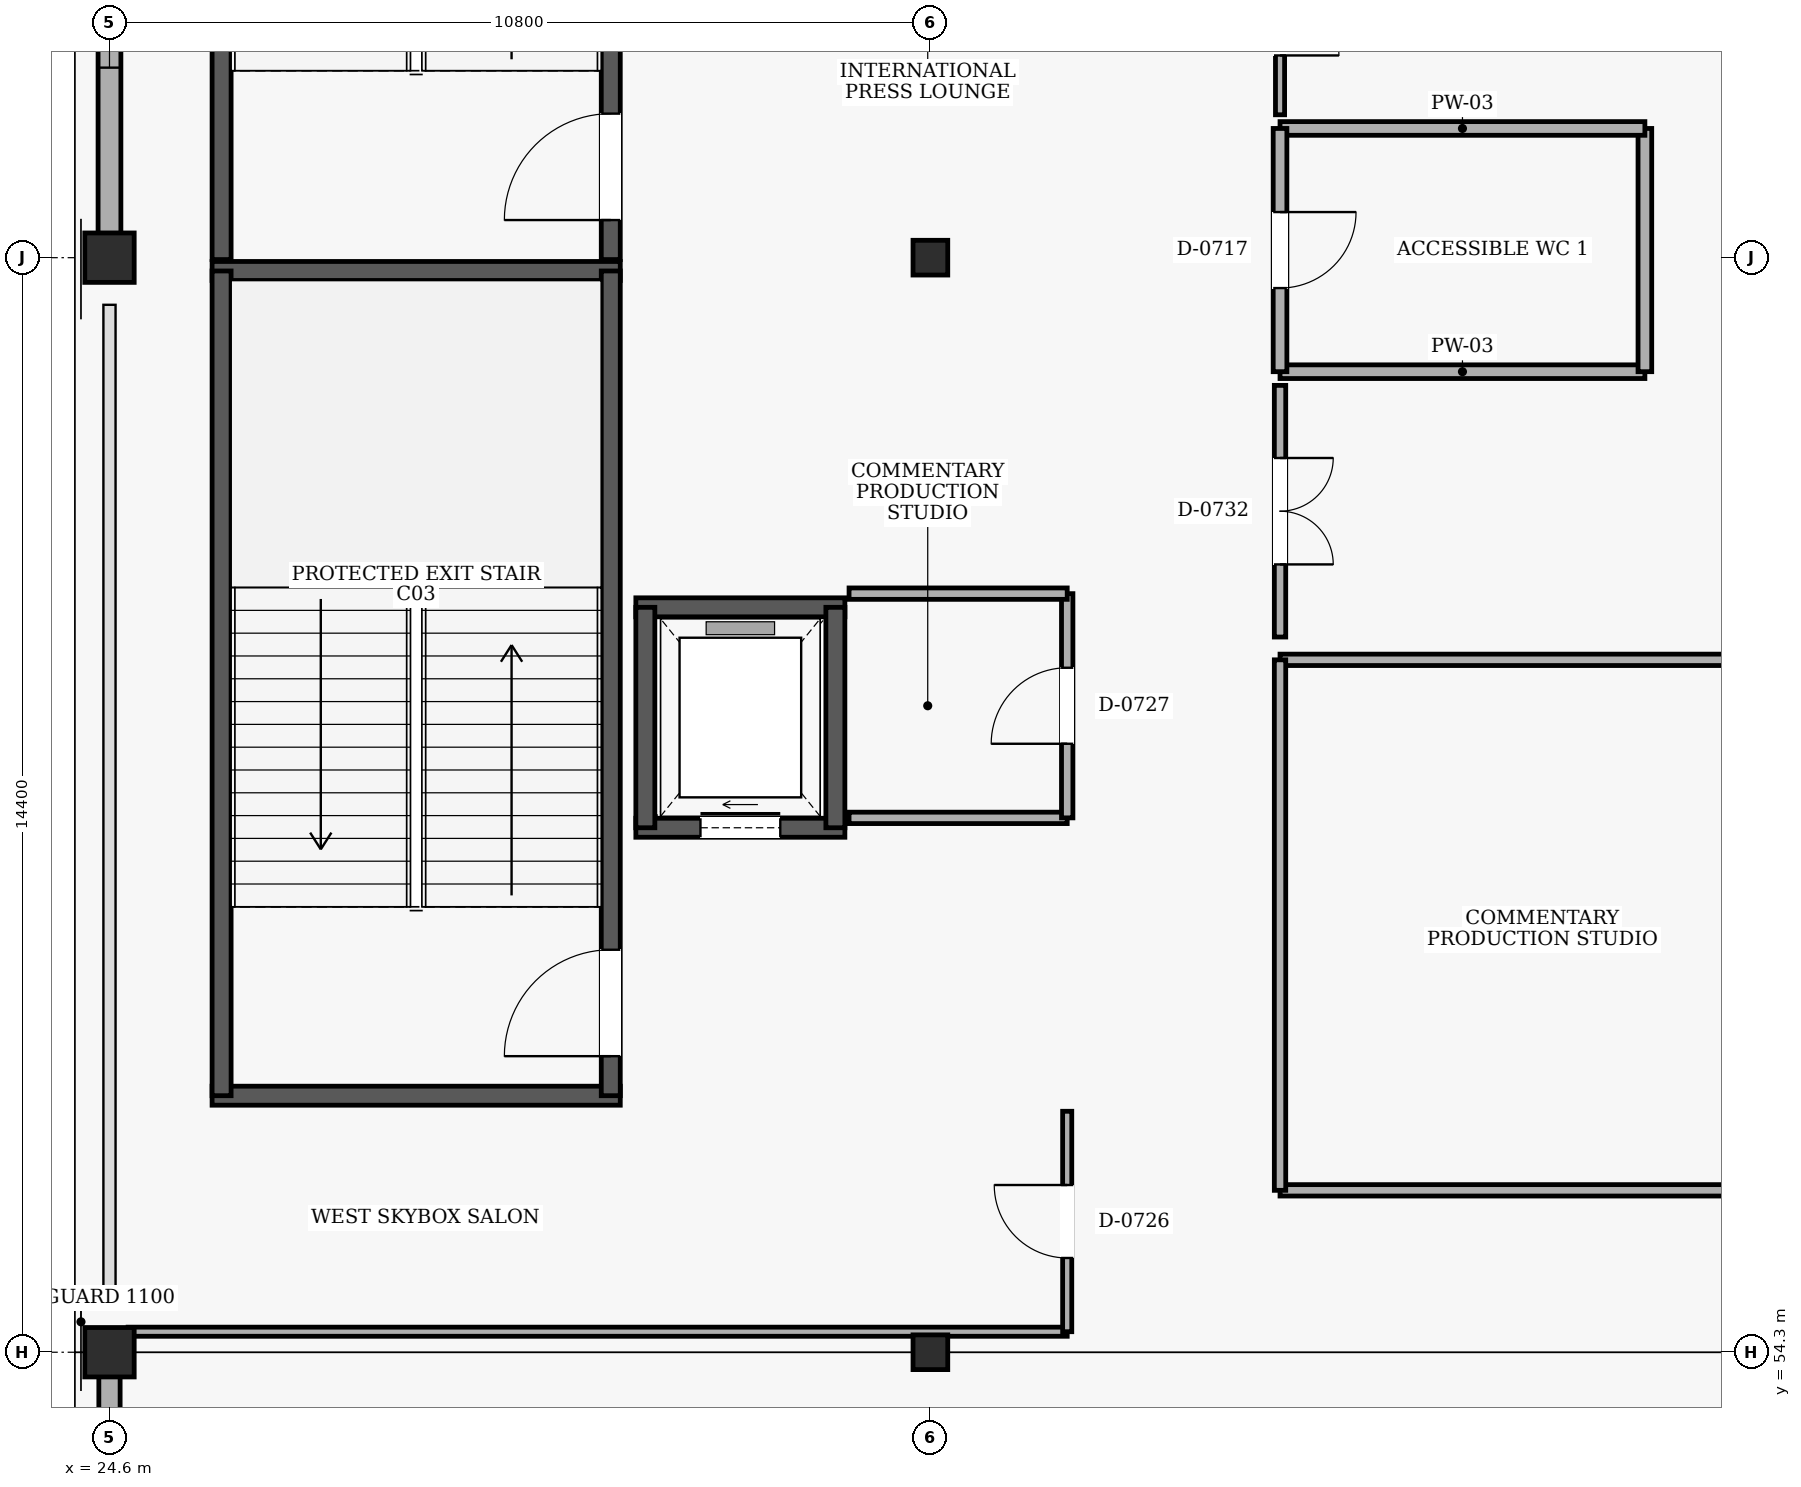
"""IFC4 building model, lengths in metres.
Left out: names, types, materials, properties, quantities, classifications, styles, units other than length and angle.
Written with IfcOpenShell. Run it as: python <this file> out.ifc"""

import sys

from ifc_helpers import new_model, si_unit, direction, frame, frame_2d, origin, origin_2d, place, context, subcontext, project, spatial, rectangle, hollow_circle, extrude, element, fill, save


model = new_model("IFC4")
c1 = context("Model", 3, precision=1e-05, world=origin(), true_north=direction((0.0, 1.0)))
c2 = subcontext(c1, "Body", "Model", "MODEL_VIEW")
j1 = project(units=[si_unit("LENGTHUNIT", "METRE"), si_unit("PLANEANGLEUNIT", "RADIAN")], contexts=[c1])
p1 = place(None, origin())
s1 = spatial("IfcSite", under=j1, at=p1, CompositionType="ELEMENT")
p2 = place(p1, origin())
s2 = spatial("IfcBuilding", under=s1, at=p2, CompositionType="ELEMENT")
p3 = place(p2, frame((0.0, 0.0, 19.8)))
s3 = spatial("IfcBuildingStorey", under=s2, at=p3, CompositionType="ELEMENT", Elevation=19.8)
for number, where, z_axis, x_axis in (
    (1, (24.6, 54.3, 0.0), (0.0, 0.0, 1.0), (1.0, 0.0, 0.0)),
    (2, (24.6, 68.7, 0.0), (0.0, 0.0, 1.0), (1.0, 0.0, 0.0)),
):
    element("IfcColumn", number, at=place(p3, frame(where, z_axis=z_axis, x_axis=x_axis)), inside=s3, PredefinedType="COLUMN", context=c2, shape_type="SweptSolid", body=[
        extrude(rectangle(XDim=0.65, YDim=0.65, at=origin_2d()), origin(), (0.0, 0.0, 1.0), 4.8),
    ])
for number, where, z_axis, x_axis in (
    (3, (35.4, 54.3, 0.0), (0.0, 0.0, 1.0), (1.0, 0.0, 0.0)),
    (4, (35.4, 68.7, 0.0), (0.0, 0.0, 1.0), (1.0, 0.0, 0.0)),
):
    element("IfcColumn", number, at=place(p3, frame(where, z_axis=z_axis, x_axis=x_axis)), inside=s3, PredefinedType="COLUMN", context=c2, shape_type="SweptSolid", body=[
        extrude(hollow_circle(Radius=0.229, WallThickness=0.02, at=origin_2d()), origin(), (0.0, 0.0, 1.0), 4.8),
    ])
p4 = place(p3, frame((24.6, 47.42, 0.0), z_axis=(0.0, 0.0, 1.0), x_axis=(0.0, 1.0, 0.0)))
e5 = element("IfcWall", 5, at=p4, inside=s3, PredefinedType="SOLIDWALL", context=c2, shape_type="SweptSolid", body=[
    extrude(rectangle(XDim=6.56, YDim=0.28, at=frame_2d((3.28, 0.0))), origin(), (0.0, 0.0, 1.0), 3.88),
])
p5 = place(p4, frame((2.48, 0.0, 0.9)))
e6 = element("IfcOpeningElement", 6, at=p5, cuts=e5, PredefinedType="OPENING", context=c2, shape_type="SweptSolid", body=[
    extrude(rectangle(XDim=1.6, YDim=1.5, at=frame_2d((0.8, 0.75))), frame((0.0, 0.15, 0.0), z_axis=(0.0, -1.0, 0.0), x_axis=(1.0, 0.0, 0.0)), (0.0, 0.0, 1.0), 0.3),
])
p6 = place(p3, frame((24.6, 69.02, 0.0), z_axis=(0.0, 0.0, 1.0), x_axis=(0.0, 1.0, 0.0)))
e7 = element("IfcWall", 7, at=p6, inside=s3, PredefinedType="SOLIDWALL", context=c2, shape_type="SweptSolid", body=[
    extrude(rectangle(XDim=6.16, YDim=0.3, at=frame_2d((3.08, 0.0))), origin(), (0.0, 0.0, 1.0), 3.88),
])
p7 = place(p6, frame((2.18, 0.0, 0.9)))
e8 = element("IfcOpeningElement", 8, at=p7, cuts=e7, PredefinedType="OPENING", context=c2, shape_type="SweptSolid", body=[
    extrude(rectangle(XDim=1.8, YDim=1.5, at=frame_2d((0.9, 0.75))), frame((0.0, 0.16, 0.0), z_axis=(0.0, -1.0, 0.0), x_axis=(1.0, 0.0, 0.0)), (0.0, 0.0, 1.0), 0.32),
])
for number, where, z_axis, x_axis in (
    (9, (25.95, 57.675, 0.0), (0.0, 0.0, 1.0), (1.0, 0.0, 0.0)),
    (10, (31.32, 68.525, 0.0), (0.0, 0.0, 1.0), (-1.0, 0.0, 0.0)),
):
    element("IfcWall", number, at=place(p3, frame(where, z_axis=z_axis, x_axis=x_axis)), inside=s3, PredefinedType="SHEAR", context=c2, shape_type="SweptSolid", body=[
        extrude(rectangle(XDim=5.37, YDim=0.25, at=frame_2d((2.685, 0.0))), origin(), (0.0, 0.0, 1.0), 4.5),
    ])
p8 = place(p3, frame((26.075, 57.675, 0.0), z_axis=(0.0, 0.0, 1.0), x_axis=(0.0, 1.0, 0.0)))
e11 = element("IfcWall", 11, at=p8, inside=s3, PredefinedType="SHEAR", context=c2, shape_type="SweptSolid", body=[
    extrude(rectangle(XDim=10.85, YDim=0.25, at=frame_2d((5.425, 0.0))), origin(), (0.0, 0.0, 1.0), 4.5),
])
p9 = place(p3, frame((31.195, 57.675, 0.0), z_axis=(0.0, 0.0, 1.0), x_axis=(0.0, 1.0, 0.0)))
e12 = element("IfcWall", 12, at=p9, inside=s3, PredefinedType="SHEAR", context=c2, shape_type="SweptSolid", body=[
    extrude(rectangle(XDim=10.85, YDim=0.25, at=frame_2d((5.425, 0.0))), origin(), (0.0, 0.0, 1.0), 4.5),
])
p10 = place(p9, frame((0.52, 0.0, 0.0)))
e13 = element("IfcOpeningElement", 13, at=p10, cuts=e12, PredefinedType="OPENING", context=c2, shape_type="SweptSolid", body=[
    extrude(rectangle(XDim=1.4, YDim=2.15, at=frame_2d((0.7, 1.075))), frame((0.0, 0.135, 0.0), z_axis=(0.0, -1.0, 0.0), x_axis=(1.0, 0.0, 0.0)), (0.0, 0.0, 1.0), 0.27),
])
p11 = place(p3, frame((26.075, 68.675, 0.0), z_axis=(0.0, 0.0, 1.0), x_axis=(0.0, 1.0, 0.0)))
e14 = element("IfcWall", 14, at=p11, inside=s3, PredefinedType="SHEAR", context=c2, shape_type="SweptSolid", body=[
    extrude(rectangle(XDim=10.85, YDim=0.25, at=frame_2d((5.425, 0.0))), origin(), (0.0, 0.0, 1.0), 4.5),
])
p12 = place(p3, frame((31.195, 68.675, 0.0), z_axis=(0.0, 0.0, 1.0), x_axis=(0.0, 1.0, 0.0)))
e15 = element("IfcWall", 15, at=p12, inside=s3, PredefinedType="SHEAR", context=c2, shape_type="SweptSolid", body=[
    extrude(rectangle(XDim=10.85, YDim=0.25, at=frame_2d((5.425, 0.0))), origin(), (0.0, 0.0, 1.0), 4.5),
])
p13 = place(p12, frame((0.52, 0.0, 0.0)))
e16 = element("IfcOpeningElement", 16, at=p13, cuts=e15, PredefinedType="OPENING", context=c2, shape_type="SweptSolid", body=[
    extrude(rectangle(XDim=1.4, YDim=2.15, at=frame_2d((0.7, 1.075))), frame((0.0, 0.135, 0.0), z_axis=(0.0, -1.0, 0.0), x_axis=(1.0, 0.0, 0.0)), (0.0, 0.0, 1.0), 0.27),
])
p14 = place(p3, frame((31.525, 61.2, 0.0), z_axis=(0.0, 0.0, 1.0), x_axis=(1.0, 0.0, 0.0)))
e17 = element("IfcWall", 17, at=p14, inside=s3, PredefinedType="SHEAR", context=c2, shape_type="SweptSolid", body=[
    extrude(rectangle(XDim=2.75, YDim=0.25, at=frame_2d((1.375, 0.0))), origin(), (0.0, 0.0, 1.0), 4.5),
])
p15 = place(p14, frame((0.85, 0.0, 0.0)))
e18 = element("IfcOpeningElement", 18, at=p15, cuts=e17, PredefinedType="OPENING", context=c2, shape_type="SweptSolid", body=[
    extrude(rectangle(XDim=1.05, YDim=2.15, at=frame_2d((0.525, 1.075))), frame((0.0, 0.135, 0.0), z_axis=(0.0, -1.0, 0.0), x_axis=(1.0, 0.0, 0.0)), (0.0, 0.0, 1.0), 0.27),
])
p16 = place(p3, frame((34.275, 64.1, 0.0), z_axis=(0.0, 0.0, 1.0), x_axis=(-1.0, 0.0, 0.0)))
e19 = element("IfcWall", 19, at=p16, inside=s3, PredefinedType="SHEAR", context=c2, shape_type="SweptSolid", body=[
    extrude(rectangle(XDim=2.75, YDim=0.25, at=frame_2d((1.375, 0.0))), origin(), (0.0, 0.0, 1.0), 4.5),
])
for number, where, z_axis, x_axis in (
    (20, (31.65, 64.1, 0.0), (0.0, 0.0, 1.0), (0.0, -1.0, 0.0)),
    (21, (34.15, 61.2, 0.0), (0.0, 0.0, 1.0), (0.0, 1.0, 0.0)),
):
    element("IfcWall", number, at=place(p3, frame(where, z_axis=z_axis, x_axis=x_axis)), inside=s3, PredefinedType="SHEAR", context=c2, shape_type="SweptSolid", body=[
        extrude(rectangle(XDim=2.9, YDim=0.25, at=frame_2d((1.45, 0.0))), origin(), (0.0, 0.0, 1.0), 4.5),
    ])
p17 = place(p3, frame((40.0, 67.2, 0.0), z_axis=(0.0, 0.0, 1.0), x_axis=(1.0, 0.0, 0.0)))
e22 = element("IfcWall", 22, at=p17, inside=s3, PredefinedType="PARTITIONING", context=c2, shape_type="SweptSolid", body=[
    extrude(rectangle(XDim=4.8, YDim=0.18, at=frame_2d((2.4, 0.0))), origin(), (0.0, 0.0, 1.0), 4.5),
])
p18 = place(p3, frame((44.8, 67.2, 0.0), z_axis=(0.0, 0.0, 1.0), x_axis=(0.0, 1.0, 0.0)))
e23 = element("IfcWall", 23, at=p18, inside=s3, PredefinedType="PARTITIONING", context=c2, shape_type="SweptSolid", body=[
    extrude(rectangle(XDim=3.2, YDim=0.18, at=frame_2d((1.6, 0.0))), origin(), (0.0, 0.0, 1.0), 4.5),
])
p19 = place(p3, frame((44.8, 70.4, 0.0), z_axis=(0.0, 0.0, 1.0), x_axis=(-1.0, 0.0, 0.0)))
e24 = element("IfcWall", 24, at=p19, inside=s3, PredefinedType="PARTITIONING", context=c2, shape_type="SweptSolid", body=[
    extrude(rectangle(XDim=4.8, YDim=0.18, at=frame_2d((2.4, 0.0))), origin(), (0.0, 0.0, 1.0), 4.5),
])
p20 = place(p3, frame((40.0, 70.4, 0.0), z_axis=(0.0, 0.0, 1.0), x_axis=(0.0, -1.0, 0.0)))
e25 = element("IfcWall", 25, at=p20, inside=s3, PredefinedType="PARTITIONING", context=c2, shape_type="SweptSolid", body=[
    extrude(rectangle(XDim=3.2, YDim=0.18, at=frame_2d((1.6, 0.0))), origin(), (0.0, 0.0, 1.0), 4.5),
])
p21 = place(p20, frame((1.1, 0.0, 0.0)))
e26 = element("IfcOpeningElement", 26, at=p21, cuts=e25, PredefinedType="OPENING", context=c2, shape_type="SweptSolid", body=[
    extrude(rectangle(XDim=1.0, YDim=2.1, at=frame_2d((0.5, 1.05))), frame((0.0, 0.1, 0.0), z_axis=(0.0, -1.0, 0.0), x_axis=(1.0, 0.0, 0.0)), (0.0, 0.0, 1.0), 0.2),
])
p22 = place(p3, frame((24.845, 54.57, 0.0), z_axis=(0.0, 0.0, 1.0), x_axis=(1.0, 0.0, 0.0)))
e27 = element("IfcWall", 27, at=p22, inside=s3, PredefinedType="PARTITIONING", context=c2, shape_type="SweptSolid", body=[
    extrude(rectangle(XDim=12.355, YDim=0.12, at=frame_2d((6.177, 0.0))), origin(), (0.0, 0.0, 1.0), 3.58),
])
p23 = place(p3, frame((37.2, 54.57, 0.0), z_axis=(0.0, 0.0, 1.0), x_axis=(0.0, 1.0, 0.0)))
e28 = element("IfcWall", 28, at=p23, inside=s3, PredefinedType="PARTITIONING", context=c2, shape_type="SweptSolid", body=[
    extrude(rectangle(XDim=2.9, YDim=0.12, at=frame_2d((1.45, 0.0))), origin(), (0.0, 0.0, 1.0), 4.5),
])
p24 = place(p23, frame((0.97, 0.0, 0.0)))
e29 = element("IfcOpeningElement", 29, at=p24, cuts=e28, PredefinedType="OPENING", context=c2, shape_type="SweptSolid", body=[
    extrude(rectangle(XDim=0.96, YDim=2.1, at=frame_2d((0.48, 1.05))), frame((0.0, 0.07, 0.0), z_axis=(0.0, -1.0, 0.0), x_axis=(1.0, 0.0, 0.0)), (0.0, 0.0, 1.0), 0.14),
])
p25 = place(p3, frame((34.33, 61.33, 0.0), z_axis=(0.0, 0.0, 1.0), x_axis=(1.0, 0.0, 0.0)))
e30 = element("IfcWall", 30, at=p25, inside=s3, PredefinedType="PARTITIONING", context=c2, shape_type="SweptSolid", body=[
    extrude(rectangle(XDim=2.87, YDim=0.15, at=frame_2d((1.435, 0.0))), origin(), (0.0, 0.0, 1.0), 4.5),
])
p26 = place(p3, frame((37.2, 61.33, 0.0), z_axis=(0.0, 0.0, 1.0), x_axis=(0.0, 1.0, 0.0)))
e31 = element("IfcWall", 31, at=p26, inside=s3, PredefinedType="PARTITIONING", context=c2, shape_type="SweptSolid", body=[
    extrude(rectangle(XDim=2.95, YDim=0.15, at=frame_2d((1.475, 0.0))), origin(), (0.0, 0.0, 1.0), 4.5),
])
p27 = place(p26, frame((0.975, 0.0, 0.0)))
e32 = element("IfcOpeningElement", 32, at=p27, cuts=e31, PredefinedType="OPENING", context=c2, shape_type="SweptSolid", body=[
    extrude(rectangle(XDim=1.0, YDim=2.1, at=frame_2d((0.5, 1.05))), frame((0.0, 0.085, 0.0), z_axis=(0.0, -1.0, 0.0), x_axis=(1.0, 0.0, 0.0)), (0.0, 0.0, 1.0), 0.17),
])
p28 = place(p3, frame((37.2, 64.28, 0.0), z_axis=(0.0, 0.0, 1.0), x_axis=(-1.0, 0.0, 0.0)))
e33 = element("IfcWall", 33, at=p28, inside=s3, PredefinedType="PARTITIONING", context=c2, shape_type="SweptSolid", body=[
    extrude(rectangle(XDim=2.87, YDim=0.15, at=frame_2d((1.435, 0.0))), origin(), (0.0, 0.0, 1.0), 4.5),
])
p29 = place(p3, frame((40.0, 56.43, 0.0), z_axis=(0.0, 0.0, 1.0), x_axis=(1.0, 0.0, 0.0)))
e34 = element("IfcWall", 34, at=p29, inside=s3, PredefinedType="PARTITIONING", context=c2, shape_type="SweptSolid", body=[
    extrude(rectangle(XDim=14.48, YDim=0.15, at=frame_2d((7.24, 0.0))), origin(), (0.0, 0.0, 1.0), 4.5),
])
p30 = place(p29, frame((7.588, 0.0, 0.0)))
e35 = element("IfcOpeningElement", 35, at=p30, cuts=e34, PredefinedType="OPENING", context=c2, shape_type="SweptSolid", body=[
    extrude(rectangle(XDim=1.3, YDim=2.2, at=frame_2d((0.65, 1.1))), frame((0.0, 0.085, 0.0), z_axis=(0.0, -1.0, 0.0), x_axis=(1.0, 0.0, 0.0)), (0.0, 0.0, 1.0), 0.17),
])
p31 = place(p3, frame((54.48, 63.409, 0.0), z_axis=(0.0, 0.0, 1.0), x_axis=(-1.0, 0.0, 0.0)))
e36 = element("IfcWall", 36, at=p31, inside=s3, PredefinedType="PARTITIONING", context=c2, shape_type="SweptSolid", body=[
    extrude(rectangle(XDim=14.48, YDim=0.15, at=frame_2d((7.24, 0.0))), origin(), (0.0, 0.0, 1.0), 4.5),
])
p32 = place(p3, frame((40.0, 63.409, 0.0), z_axis=(0.0, 0.0, 1.0), x_axis=(0.0, -1.0, 0.0)))
e37 = element("IfcWall", 37, at=p32, inside=s3, PredefinedType="PARTITIONING", context=c2, shape_type="SweptSolid", body=[
    extrude(rectangle(XDim=6.979, YDim=0.15, at=frame_2d((3.49, 0.0))), origin(), (0.0, 0.0, 1.0), 4.5),
])
p33 = place(p3, frame((40.0, 67.02, 0.0), z_axis=(0.0, 0.0, 1.0), x_axis=(0.0, -1.0, 0.0)))
e38 = element("IfcWall", 38, at=p33, inside=s3, PredefinedType="PARTITIONING", context=c2, shape_type="SweptSolid", body=[
    extrude(rectangle(XDim=3.311, YDim=0.15, at=frame_2d((1.655, 0.0))), origin(), (0.0, 0.0, 1.0), 4.5),
])
p34 = place(p33, frame((0.955, 0.0, 0.0)))
e39 = element("IfcOpeningElement", 39, at=p34, cuts=e38, PredefinedType="OPENING", context=c2, shape_type="SweptSolid", body=[
    extrude(rectangle(XDim=1.4, YDim=2.2, at=frame_2d((0.7, 1.1))), frame((0.0, 0.085, 0.0), z_axis=(0.0, -1.0, 0.0), x_axis=(1.0, 0.0, 0.0)), (0.0, 0.0, 1.0), 0.17),
])
p35 = place(p3, frame((40.0, 73.691, 0.0), z_axis=(0.0, 0.0, 1.0), x_axis=(0.0, -1.0, 0.0)))
e40 = element("IfcWall", 40, at=p35, inside=s3, PredefinedType="PARTITIONING", context=c2, shape_type="SweptSolid", body=[
    extrude(rectangle(XDim=3.111, YDim=0.12, at=frame_2d((1.555, 0.0))), origin(), (0.0, 0.0, 1.0), 4.5),
])
p36 = place(p35, frame((0.781, 0.0, 0.0)))
e41 = element("IfcOpeningElement", 41, at=p36, cuts=e40, PredefinedType="OPENING", context=c2, shape_type="SweptSolid", body=[
    extrude(rectangle(XDim=1.55, YDim=2.2, at=frame_2d((0.775, 1.1))), frame((0.0, 0.07, 0.0), z_axis=(0.0, -1.0, 0.0), x_axis=(1.0, 0.0, 0.0)), (0.0, 0.0, 1.0), 0.14),
])
p37 = place(p7, origin())
e42 = element("IfcWindow", 42, at=p37, inside=s3, PartitioningType="SINGLE_PANEL", PredefinedType="WINDOW", context=c2, shape_type="SweptSolid", body=[
    extrude(rectangle(XDim=1.8, YDim=1.5, at=frame_2d((0.9, 0.75))), frame((0.0, 0.03, 0.0), z_axis=(0.0, -1.0, 0.0), x_axis=(1.0, 0.0, 0.0)), (0.0, 0.0, 1.0), 0.06),
])
fill(e8, e42)
p38 = place(p10, origin())
e43 = element("IfcDoor", 43, at=p38, inside=s3, OperationType="SINGLE_SWING_LEFT", PredefinedType="DOOR", context=c2, shape_type="SweptSolid", body=[
    extrude(rectangle(XDim=1.4, YDim=2.15, at=frame_2d((0.7, 1.075))), frame((0.0, 0.025, 0.0), z_axis=(0.0, -1.0, 0.0), x_axis=(1.0, 0.0, 0.0)), (0.0, 0.0, 1.0), 0.05),
])
fill(e13, e43)
p39 = place(p13, origin())
e44 = element("IfcDoor", 44, at=p39, inside=s3, OperationType="SINGLE_SWING_LEFT", PredefinedType="DOOR", context=c2, shape_type="SweptSolid", body=[
    extrude(rectangle(XDim=1.4, YDim=2.15, at=frame_2d((0.7, 1.075))), frame((0.0, 0.025, 0.0), z_axis=(0.0, -1.0, 0.0), x_axis=(1.0, 0.0, 0.0)), (0.0, 0.0, 1.0), 0.05),
])
fill(e16, e44)
p40 = place(p15, origin())
e45 = element("IfcDoor", 45, at=p40, inside=s3, OperationType="SLIDING_TO_RIGHT", PredefinedType="DOOR", context=c2, shape_type="SweptSolid", body=[
    extrude(rectangle(XDim=1.05, YDim=2.15, at=frame_2d((0.525, 1.075))), frame((0.0, 0.025, 0.0), z_axis=(0.0, -1.0, 0.0), x_axis=(1.0, 0.0, 0.0)), (0.0, 0.0, 1.0), 0.05),
])
fill(e18, e45)
p41 = place(p21, origin())
e46 = element("IfcDoor", 46, at=p41, inside=s3, OperationType="SINGLE_SWING_LEFT", PredefinedType="DOOR", context=c2, shape_type="SweptSolid", body=[
    extrude(rectangle(XDim=1.0, YDim=2.1, at=frame_2d((0.5, 1.05))), frame((0.0, 0.025, 0.0), z_axis=(0.0, -1.0, 0.0), x_axis=(1.0, 0.0, 0.0)), (0.0, 0.0, 1.0), 0.05),
])
fill(e26, e46)
p42 = place(p24, origin())
e47 = element("IfcDoor", 47, at=p42, inside=s3, OperationType="SINGLE_SWING_RIGHT", PredefinedType="DOOR", context=c2, shape_type="SweptSolid", body=[
    extrude(rectangle(XDim=0.96, YDim=2.1, at=frame_2d((0.48, 1.05))), frame((0.0, 0.025, 0.0), z_axis=(0.0, -1.0, 0.0), x_axis=(1.0, 0.0, 0.0)), (0.0, 0.0, 1.0), 0.05),
])
fill(e29, e47)
p43 = place(p27, origin())
e48 = element("IfcDoor", 48, at=p43, inside=s3, OperationType="SINGLE_SWING_LEFT", PredefinedType="DOOR", context=c2, shape_type="SweptSolid", body=[
    extrude(rectangle(XDim=1.0, YDim=2.1, at=frame_2d((0.5, 1.05))), frame((0.0, 0.025, 0.0), z_axis=(0.0, -1.0, 0.0), x_axis=(1.0, 0.0, 0.0)), (0.0, 0.0, 1.0), 0.05),
])
fill(e32, e48)
p44 = place(p34, origin())
e49 = element("IfcDoor", 49, at=p44, inside=s3, OperationType="DOUBLE_DOOR_SINGLE_SWING", PredefinedType="DOOR", context=c2, shape_type="SweptSolid", body=[
    extrude(rectangle(XDim=1.4, YDim=2.2, at=frame_2d((0.7, 1.1))), frame((0.0, 0.025, 0.0), z_axis=(0.0, -1.0, 0.0), x_axis=(1.0, 0.0, 0.0)), (0.0, 0.0, 1.0), 0.05),
])
fill(e39, e49)
p45 = place(p36, origin())
e50 = element("IfcDoor", 50, at=p45, inside=s3, OperationType="DOUBLE_DOOR_SINGLE_SWING", PredefinedType="DOOR", context=c2, shape_type="SweptSolid", body=[
    extrude(rectangle(XDim=1.55, YDim=2.2, at=frame_2d((0.775, 1.1))), frame((0.0, 0.025, 0.0), z_axis=(0.0, -1.0, 0.0), x_axis=(1.0, 0.0, 0.0)), (0.0, 0.0, 1.0), 0.05),
])
fill(e41, e50)
save(model, sys.argv[1])
